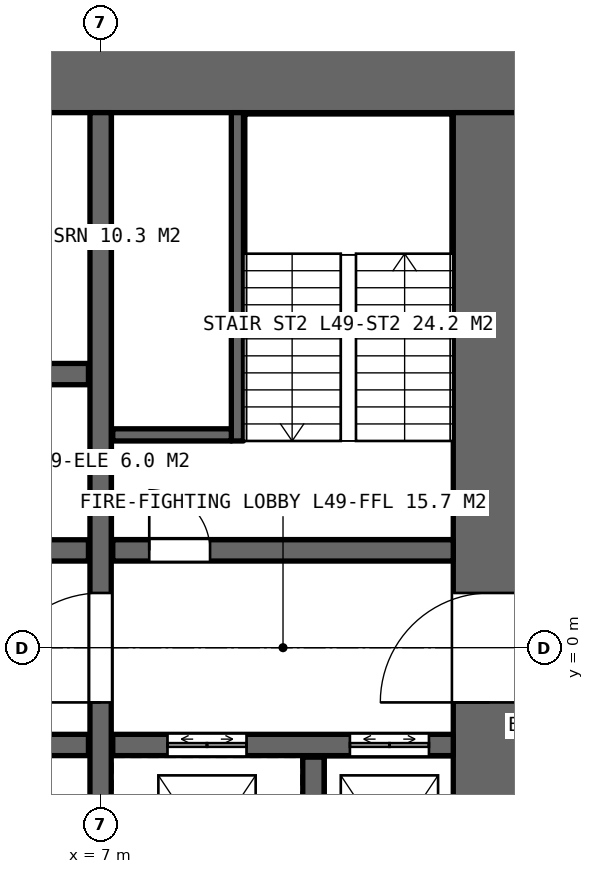
"""IFC4 building model, lengths in metres.
Left out: names, types, materials, properties, quantities, classifications, styles, units other than length and angle.
Written with IfcOpenShell. Run it as: python <this file> out.ifc"""

import sys

from ifc_helpers import new_model, si_unit, direction, frame, frame_2d, origin, place, context, subcontext, project, spatial, rectangle, extrude, element, fill, save


model = new_model("IFC4")
c1 = context("Model", 3, precision=1e-05, world=origin(), true_north=direction((0.0, 1.0)))
c2 = subcontext(c1, "Body", "Model", "MODEL_VIEW")
j1 = project(units=[si_unit("LENGTHUNIT", "METRE"), si_unit("PLANEANGLEUNIT", "RADIAN")], contexts=[c1])
p1 = place(None, origin())
s1 = spatial("IfcSite", under=j1, at=p1, CompositionType="ELEMENT")
p2 = place(p1, origin())
s2 = spatial("IfcBuilding", under=s1, at=p2, CompositionType="ELEMENT")
p3 = place(p2, frame((0.0, 0.0, 224.2)))
s3 = spatial("IfcBuildingStorey", under=s2, at=p3, CompositionType="ELEMENT", Elevation=224.2)
p4 = place(p3, frame((14.0, 9.4, 0.0), z_axis=(0.0, 0.0, 1.0), x_axis=(-1.0, 0.0, 0.0)))
e1 = element("IfcWall", 1, at=p4, inside=s3, PredefinedType="SHEAR", context=c2, shape_type="SweptSolid", body=[
    extrude(rectangle(XDim=28.0, YDim=1.2, at=frame_2d((14.0, 0.0))), origin(), (0.0, 0.0, 1.0), 4.2),
])
p5 = place(p4, frame((24.0, 0.0, 0.0)))
e2 = element("IfcOpeningElement", 2, at=p5, cuts=e1, PredefinedType="OPENING", context=c2, shape_type="SweptSolid", body=[
    extrude(rectangle(XDim=1.0, YDim=2.4, at=frame_2d((0.5, 1.2))), frame((0.0, 0.61, 0.0), z_axis=(0.0, -1.0, 0.0), x_axis=(1.0, 0.0, 0.0)), (0.0, 0.0, 1.0), 1.22),
])
p6 = place(p3, frame((13.4, -8.8, 0.0), z_axis=(0.0, 0.0, 1.0), x_axis=(0.0, 1.0, 0.0)))
e3 = element("IfcWall", 3, at=p6, inside=s3, PredefinedType="SHEAR", context=c2, shape_type="SweptSolid", body=[
    extrude(rectangle(XDim=17.6, YDim=1.2, at=frame_2d((8.8, 0.0))), origin(), (0.0, 0.0, 1.0), 4.2),
])
p7 = place(p6, frame((7.9, 0.0, 0.0)))
e4 = element("IfcOpeningElement", 4, at=p7, cuts=e3, PredefinedType="OPENING", context=c2, shape_type="SweptSolid", body=[
    extrude(rectangle(XDim=1.8, YDim=2.4, at=frame_2d((0.9, 1.2))), frame((0.0, 0.61, 0.0), z_axis=(0.0, -1.0, 0.0), x_axis=(1.0, 0.0, 0.0)), (0.0, 0.0, 1.0), 1.22),
])
p8 = place(p3, frame((7.0, -8.8, 0.0), z_axis=(0.0, 0.0, 1.0), x_axis=(0.0, 1.0, 0.0)))
e5 = element("IfcWall", 5, at=p8, inside=s3, PredefinedType="SHEAR", context=c2, shape_type="SweptSolid", body=[
    extrude(rectangle(XDim=17.6, YDim=0.35, at=frame_2d((8.8, 0.0))), origin(), (0.0, 0.0, 1.0), 4.2),
])
p9 = place(p8, frame((7.9, 0.0, 0.0)))
e6 = element("IfcOpeningElement", 6, at=p9, cuts=e5, PredefinedType="OPENING", context=c2, shape_type="SweptSolid", body=[
    extrude(rectangle(XDim=1.8, YDim=2.4, at=frame_2d((0.9, 1.2))), frame((0.0, 0.185, 0.0), z_axis=(0.0, -1.0, 0.0), x_axis=(1.0, 0.0, 0.0)), (0.0, 0.0, 1.0), 0.37),
])
p10 = place(p3, frame((-6.8, 1.6, 0.0), z_axis=(0.0, 0.0, 1.0), x_axis=(1.0, 0.0, 0.0)))
e7 = element("IfcWall", 7, at=p10, inside=s3, PredefinedType="SHEAR", context=c2, shape_type="SweptSolid", body=[
    extrude(rectangle(XDim=13.6, YDim=0.35, at=frame_2d((6.8, 0.0))), origin(), (0.0, 0.0, 1.0), 4.2),
])
p11 = place(p10, frame((11.9, 0.0, 0.0)))
e8 = element("IfcOpeningElement", 8, at=p11, cuts=e7, PredefinedType="OPENING", context=c2, shape_type="SweptSolid", body=[
    extrude(rectangle(XDim=1.0, YDim=2.4, at=frame_2d((0.5, 1.2))), frame((0.0, 0.185, 0.0), z_axis=(0.0, -1.0, 0.0), x_axis=(1.0, 0.0, 0.0)), (0.0, 0.0, 1.0), 0.37),
])
p12 = place(p10, frame((4.5, 0.0, 0.0)))
e9 = element("IfcOpeningElement", 9, at=p12, cuts=e7, PredefinedType="OPENING", context=c2, shape_type="SweptSolid", body=[
    extrude(rectangle(XDim=1.8, YDim=2.4, at=frame_2d((0.9, 1.2))), frame((0.0, 0.185, 0.0), z_axis=(0.0, -1.0, 0.0), x_axis=(1.0, 0.0, 0.0)), (0.0, 0.0, 1.0), 0.37),
])
p13 = place(p3, frame((-6.8, -1.6, 0.0), z_axis=(0.0, 0.0, 1.0), x_axis=(1.0, 0.0, 0.0)))
e10 = element("IfcWall", 10, at=p13, inside=s3, PredefinedType="SHEAR", context=c2, shape_type="SweptSolid", body=[
    extrude(rectangle(XDim=13.6, YDim=0.35, at=frame_2d((6.8, 0.0))), origin(), (0.0, 0.0, 1.0), 4.2),
])
p14 = place(p13, frame((1.665, 0.0, 0.0)))
e11 = element("IfcOpeningElement", 11, at=p14, cuts=e10, PredefinedType="OPENING", context=c2, shape_type="SweptSolid", body=[
    extrude(rectangle(XDim=1.0, YDim=2.4, at=frame_2d((0.5, 1.2))), frame((0.0, 0.185, 0.0), z_axis=(0.0, -1.0, 0.0), x_axis=(1.0, 0.0, 0.0)), (0.0, 0.0, 1.0), 0.37),
])
p15 = place(p13, frame((5.45, 0.0, 0.0)))
e12 = element("IfcOpeningElement", 12, at=p15, cuts=e10, PredefinedType="OPENING", context=c2, shape_type="SweptSolid", body=[
    extrude(rectangle(XDim=1.1, YDim=2.4, at=frame_2d((0.55, 1.2))), frame((0.0, 0.185, 0.0), z_axis=(0.0, -1.0, 0.0), x_axis=(1.0, 0.0, 0.0)), (0.0, 0.0, 1.0), 0.37),
])
p16 = place(p13, frame((8.735, 0.0, 0.0)))
e13 = element("IfcOpeningElement", 13, at=p16, cuts=e10, PredefinedType="OPENING", context=c2, shape_type="SweptSolid", body=[
    extrude(rectangle(XDim=1.0, YDim=2.4, at=frame_2d((0.5, 1.2))), frame((0.0, 0.185, 0.0), z_axis=(0.0, -1.0, 0.0), x_axis=(1.0, 0.0, 0.0)), (0.0, 0.0, 1.0), 0.37),
])
p17 = place(p13, frame((11.95, 0.0, 0.0)))
e14 = element("IfcOpeningElement", 14, at=p17, cuts=e10, PredefinedType="OPENING", context=c2, shape_type="SweptSolid", body=[
    extrude(rectangle(XDim=0.9, YDim=2.4, at=frame_2d((0.45, 1.2))), frame((0.0, 0.185, 0.0), z_axis=(0.0, -1.0, 0.0), x_axis=(1.0, 0.0, 0.0)), (0.0, 0.0, 1.0), 0.37),
])
p18 = place(p3, frame((-6.8, 4.5, 0.0), z_axis=(0.0, 0.0, 1.0), x_axis=(1.0, 0.0, 0.0)))
e15 = element("IfcWall", 15, at=p18, inside=s3, PredefinedType="SHEAR", context=c2, shape_type="SweptSolid", body=[
    extrude(rectangle(XDim=13.6, YDim=0.35, at=frame_2d((6.8, 0.0))), origin(), (0.0, 0.0, 1.0), 4.2),
])
p19 = place(p18, frame((0.7, 0.0, 0.0)))
e16 = element("IfcOpeningElement", 16, at=p19, cuts=e15, PredefinedType="OPENING", context=c2, shape_type="SweptSolid", body=[
    extrude(rectangle(XDim=1.1, YDim=2.4, at=frame_2d((0.55, 1.2))), frame((0.0, 0.185, 0.0), z_axis=(0.0, -1.0, 0.0), x_axis=(1.0, 0.0, 0.0)), (0.0, 0.0, 1.0), 0.37),
])
p20 = place(p18, frame((3.5, 0.0, 0.0)))
e17 = element("IfcOpeningElement", 17, at=p20, cuts=e15, PredefinedType="OPENING", context=c2, shape_type="SweptSolid", body=[
    extrude(rectangle(XDim=1.1, YDim=2.4, at=frame_2d((0.55, 1.2))), frame((0.0, 0.185, 0.0), z_axis=(0.0, -1.0, 0.0), x_axis=(1.0, 0.0, 0.0)), (0.0, 0.0, 1.0), 0.37),
])
p21 = place(p18, frame((6.3, 0.0, 0.0)))
e18 = element("IfcOpeningElement", 18, at=p21, cuts=e15, PredefinedType="OPENING", context=c2, shape_type="SweptSolid", body=[
    extrude(rectangle(XDim=1.1, YDim=2.4, at=frame_2d((0.55, 1.2))), frame((0.0, 0.185, 0.0), z_axis=(0.0, -1.0, 0.0), x_axis=(1.0, 0.0, 0.0)), (0.0, 0.0, 1.0), 0.37),
])
p22 = place(p18, frame((9.1, 0.0, 0.0)))
e19 = element("IfcOpeningElement", 19, at=p22, cuts=e15, PredefinedType="OPENING", context=c2, shape_type="SweptSolid", body=[
    extrude(rectangle(XDim=1.1, YDim=2.4, at=frame_2d((0.55, 1.2))), frame((0.0, 0.185, 0.0), z_axis=(0.0, -1.0, 0.0), x_axis=(1.0, 0.0, 0.0)), (0.0, 0.0, 1.0), 0.37),
])
p23 = place(p3, frame((7.2, 1.6, 0.0), z_axis=(0.0, 0.0, 1.0), x_axis=(1.0, 0.0, 0.0)))
e20 = element("IfcWall", 20, at=p23, inside=s3, PredefinedType="SHEAR", context=c2, shape_type="SweptSolid", body=[
    extrude(rectangle(XDim=5.6, YDim=0.35, at=frame_2d((2.8, 0.0))), origin(), (0.0, 0.0, 1.0), 4.2),
])
p24 = place(p23, frame((0.6, 0.0, 0.0)))
e21 = element("IfcOpeningElement", 21, at=p24, cuts=e20, PredefinedType="OPENING", context=c2, shape_type="SweptSolid", body=[
    extrude(rectangle(XDim=1.0, YDim=2.4, at=frame_2d((0.5, 1.2))), frame((0.0, 0.185, 0.0), z_axis=(0.0, -1.0, 0.0), x_axis=(1.0, 0.0, 0.0)), (0.0, 0.0, 1.0), 0.37),
])
p25 = place(p3, frame((7.2, -1.6, 0.0), z_axis=(0.0, 0.0, 1.0), x_axis=(1.0, 0.0, 0.0)))
e22 = element("IfcWall", 22, at=p25, inside=s3, PredefinedType="SHEAR", context=c2, shape_type="SweptSolid", body=[
    extrude(rectangle(XDim=5.6, YDim=0.35, at=frame_2d((2.8, 0.0))), origin(), (0.0, 0.0, 1.0), 4.2),
])
p26 = place(p25, frame((0.9, 0.0, 0.0)))
e23 = element("IfcOpeningElement", 23, at=p26, cuts=e22, PredefinedType="OPENING", context=c2, shape_type="SweptSolid", body=[
    extrude(rectangle(XDim=1.3, YDim=2.4, at=frame_2d((0.65, 1.2))), frame((0.0, 0.185, 0.0), z_axis=(0.0, -1.0, 0.0), x_axis=(1.0, 0.0, 0.0)), (0.0, 0.0, 1.0), 0.37),
])
p27 = place(p25, frame((3.9, 0.0, 0.0)))
e24 = element("IfcOpeningElement", 24, at=p27, cuts=e22, PredefinedType="OPENING", context=c2, shape_type="SweptSolid", body=[
    extrude(rectangle(XDim=1.3, YDim=2.4, at=frame_2d((0.65, 1.2))), frame((0.0, 0.185, 0.0), z_axis=(0.0, -1.0, 0.0), x_axis=(1.0, 0.0, 0.0)), (0.0, 0.0, 1.0), 0.37),
])
p28 = place(p3, frame((10.5, -4.8, 0.0), z_axis=(0.0, 0.0, 1.0), x_axis=(0.0, 1.0, 0.0)))
e25 = element("IfcWall", 25, at=p28, inside=s3, PredefinedType="SHEAR", context=c2, shape_type="SweptSolid", body=[
    extrude(rectangle(XDim=3.0, YDim=0.35, at=frame_2d((1.5, 0.0))), origin(), (0.0, 0.0, 1.0), 4.2),
])
p29 = place(p3, frame((9.25, 3.4, 0.0), z_axis=(0.0, 0.0, 1.0), x_axis=(0.0, 1.0, 0.0)))
e26 = element("IfcWall", 26, at=p29, inside=s3, PredefinedType="SOLIDWALL", context=c2, shape_type="SweptSolid", body=[
    extrude(rectangle(XDim=5.4, YDim=0.2, at=frame_2d((2.7, 0.0))), origin(), (0.0, 0.0, 1.0), 4.2),
])
p30 = place(p3, frame((9.15, 3.5, 0.0), z_axis=(0.0, 0.0, 1.0), x_axis=(-1.0, 0.0, 0.0)))
e27 = element("IfcWall", 27, at=p30, inside=s3, PredefinedType="SOLIDWALL", context=c2, shape_type="SweptSolid", body=[
    extrude(rectangle(XDim=1.95, YDim=0.2, at=frame_2d((0.975, 0.0))), origin(), (0.0, 0.0, 1.0), 4.2),
])
p31 = place(p7, origin())
e28 = element("IfcDoor", 28, at=p31, inside=s3, OperationType="DOUBLE_DOOR_SINGLE_SWING", PredefinedType="DOOR", context=c2, shape_type="SweptSolid", body=[
    extrude(rectangle(XDim=1.8, YDim=2.4, at=frame_2d((0.9, 1.2))), frame((0.0, 0.025, 0.0), z_axis=(0.0, -1.0, 0.0), x_axis=(1.0, 0.0, 0.0)), (0.0, 0.0, 1.0), 0.05),
])
fill(e4, e28)
p32 = place(p9, origin())
e29 = element("IfcDoor", 29, at=p32, inside=s3, OperationType="DOUBLE_DOOR_SINGLE_SWING", PredefinedType="DOOR", context=c2, shape_type="SweptSolid", body=[
    extrude(rectangle(XDim=1.8, YDim=2.4, at=frame_2d((0.9, 1.2))), frame((0.0, 0.025, 0.0), z_axis=(0.0, -1.0, 0.0), x_axis=(1.0, 0.0, 0.0)), (0.0, 0.0, 1.0), 0.05),
])
fill(e6, e29)
p33 = place(p24, origin())
e30 = element("IfcDoor", 30, at=p33, inside=s3, OperationType="SINGLE_SWING_LEFT", PredefinedType="DOOR", context=c2, shape_type="SweptSolid", body=[
    extrude(rectangle(XDim=1.0, YDim=2.4, at=frame_2d((0.5, 1.2))), frame((0.0, 0.025, 0.0), z_axis=(0.0, -1.0, 0.0), x_axis=(1.0, 0.0, 0.0)), (0.0, 0.0, 1.0), 0.05),
])
fill(e21, e30)
p34 = place(p26, origin())
e31 = element("IfcDoor", 31, at=p34, inside=s3, OperationType="DOUBLE_DOOR_SLIDING", PredefinedType="DOOR", context=c2, shape_type="SweptSolid", body=[
    extrude(rectangle(XDim=1.3, YDim=2.4, at=frame_2d((0.65, 1.2))), frame((0.0, 0.025, 0.0), z_axis=(0.0, -1.0, 0.0), x_axis=(1.0, 0.0, 0.0)), (0.0, 0.0, 1.0), 0.05),
])
fill(e23, e31)
p35 = place(p27, origin())
e32 = element("IfcDoor", 32, at=p35, inside=s3, OperationType="DOUBLE_DOOR_SLIDING", PredefinedType="DOOR", context=c2, shape_type="SweptSolid", body=[
    extrude(rectangle(XDim=1.3, YDim=2.4, at=frame_2d((0.65, 1.2))), frame((0.0, 0.025, 0.0), z_axis=(0.0, -1.0, 0.0), x_axis=(1.0, 0.0, 0.0)), (0.0, 0.0, 1.0), 0.05),
])
fill(e24, e32)
save(model, sys.argv[1])
